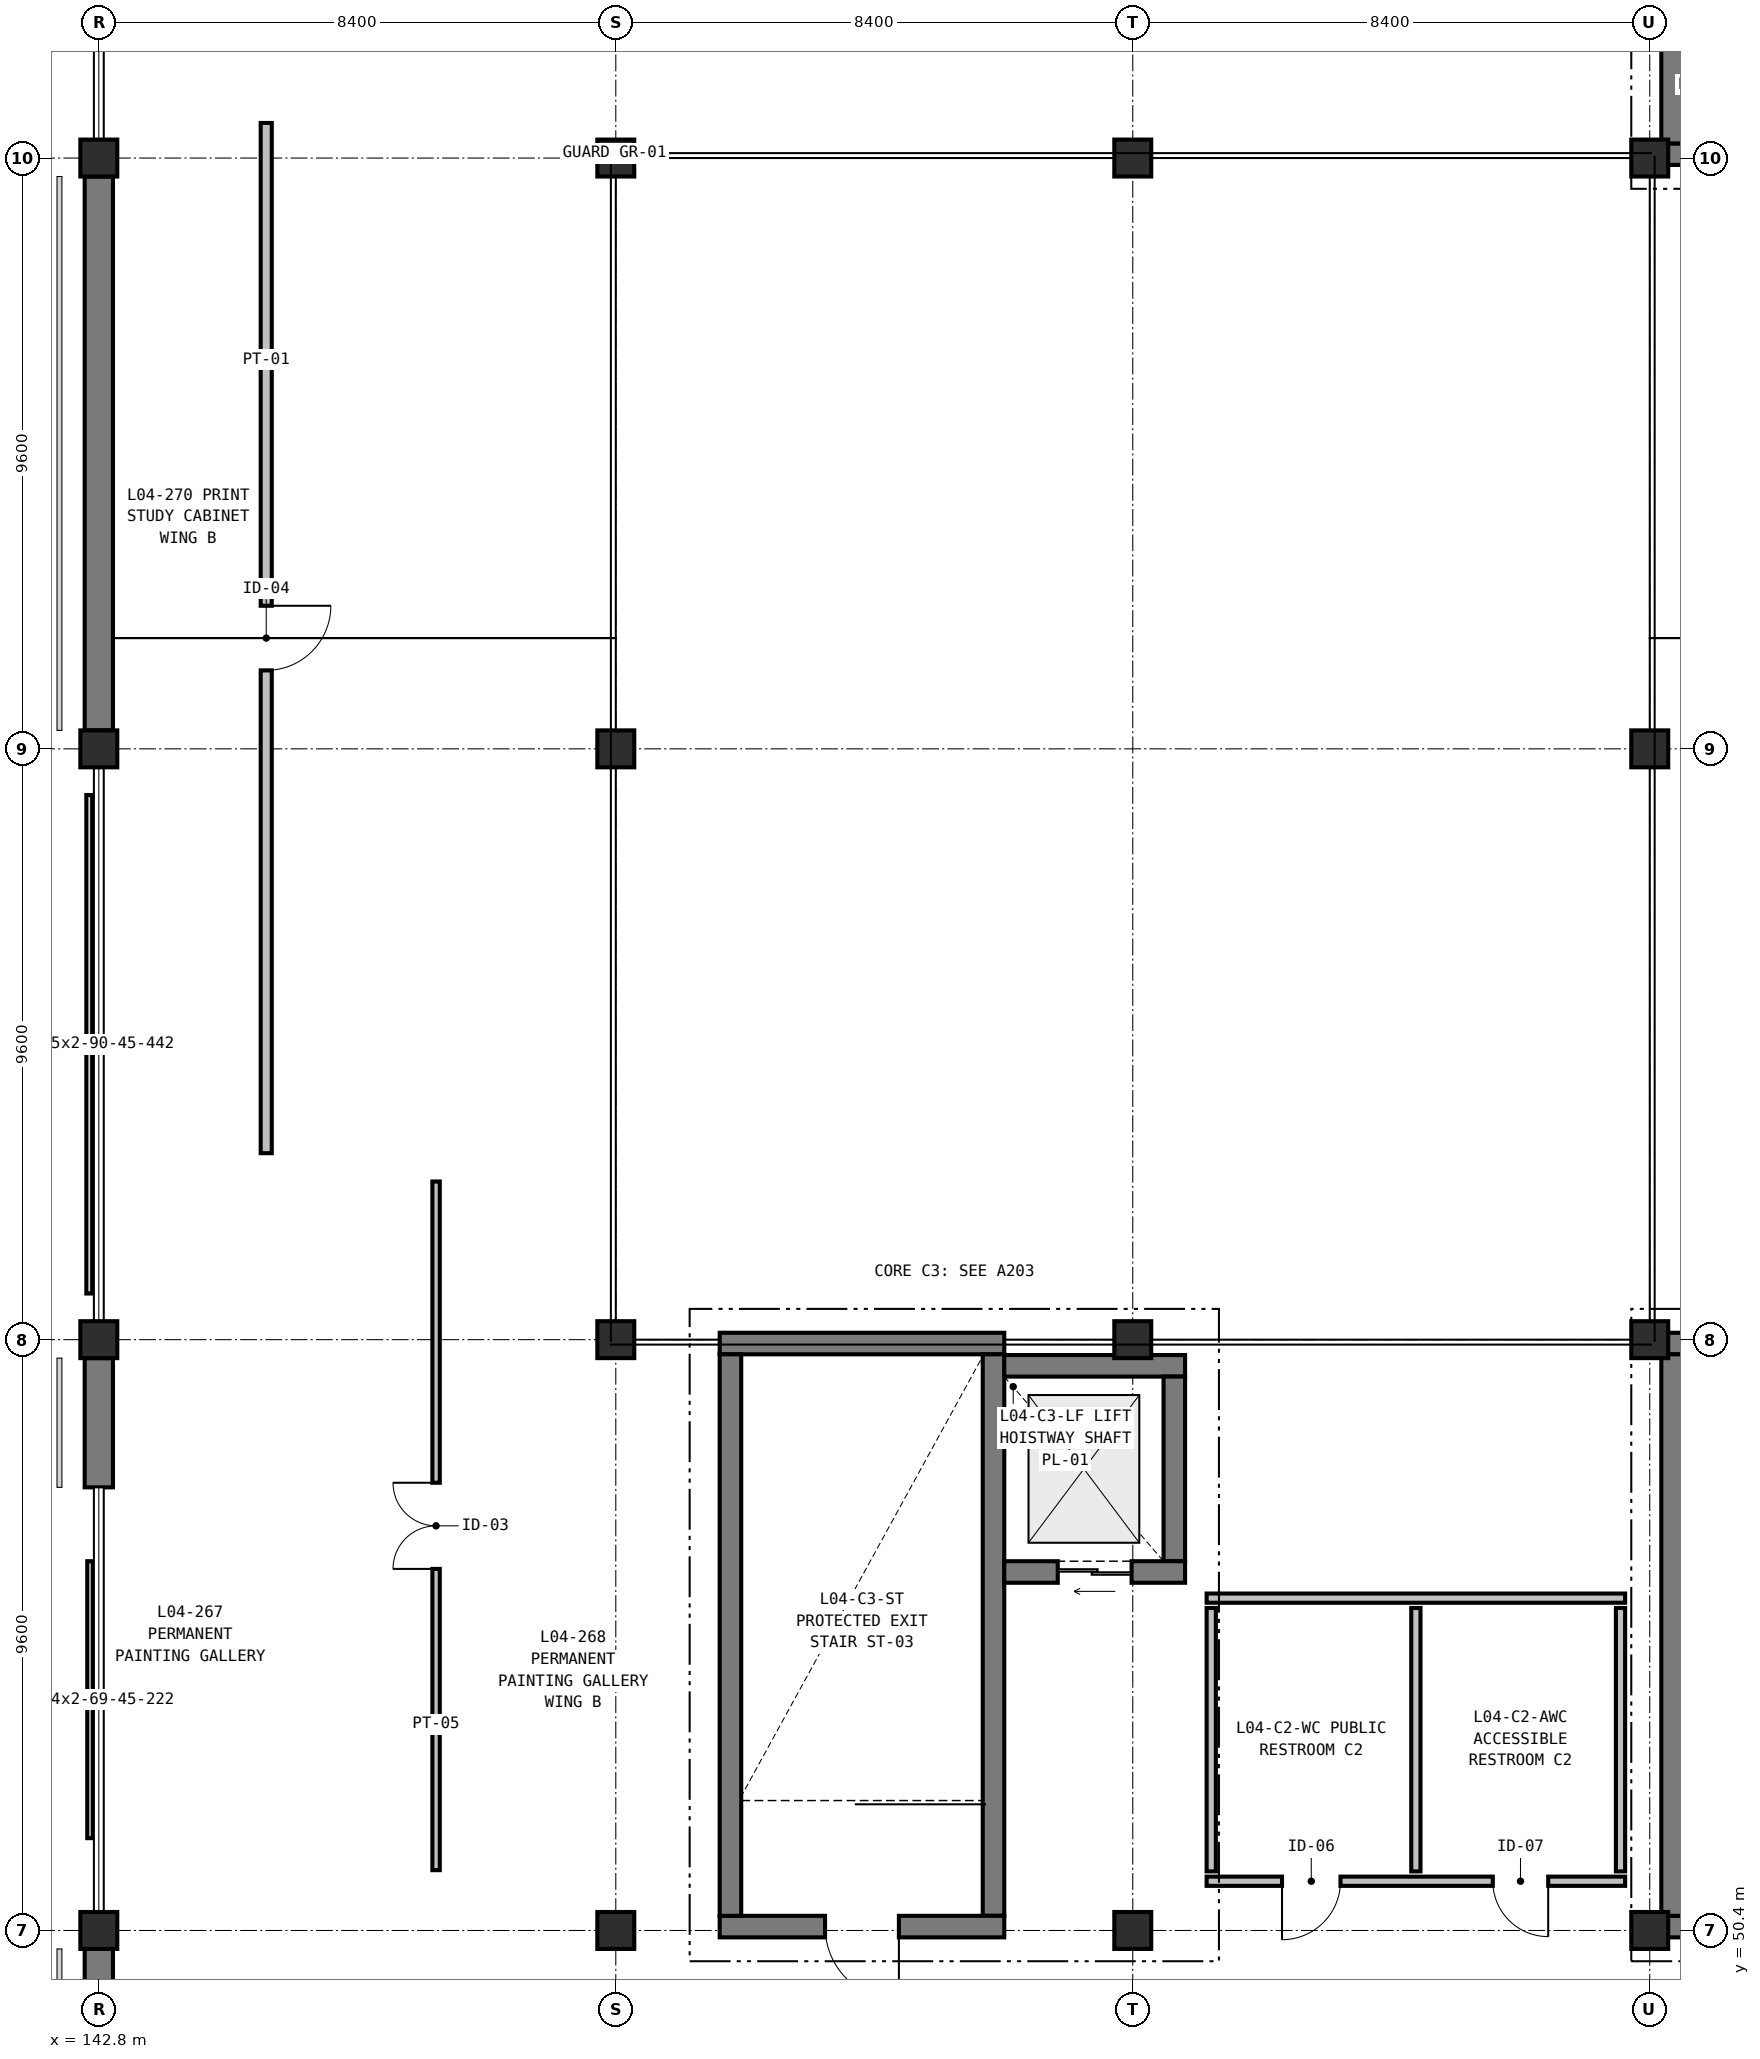
"""IFC4 building model, lengths in metres.
Left out: names, types, materials, properties, quantities, classifications, styles, units other than length and angle.
Written with IfcOpenShell. Run it as: python <this file> out.ifc"""

import sys

from ifc_helpers import new_model, si_unit, direction, frame, frame_2d, origin, origin_2d, place, context, subcontext, project, spatial, rectangle, extrude, element, fill, save


model = new_model("IFC4")
c1 = context("Model", 3, precision=1e-05, world=origin(), true_north=direction((0.0, 1.0)))
c2 = subcontext(c1, "Body", "Model", "MODEL_VIEW")
j1 = project(units=[si_unit("LENGTHUNIT", "METRE"), si_unit("PLANEANGLEUNIT", "RADIAN")], contexts=[c1])
p1 = place(None, origin())
s1 = spatial("IfcSite", under=j1, at=p1, CompositionType="ELEMENT")
p2 = place(p1, origin())
s2 = spatial("IfcBuilding", under=s1, at=p2, CompositionType="ELEMENT")
p3 = place(p2, frame((0.0, 0.0, 22.2)))
s3 = spatial("IfcBuildingStorey", under=s2, at=p3, CompositionType="ELEMENT", Elevation=22.2)
for number, where, z_axis, x_axis in (
    (1, (142.8, 50.4, 0.0), (0.0, 0.0, 1.0), (1.0, 0.0, 0.0)),
    (2, (142.8, 60.0, 0.0), (0.0, 0.0, 1.0), (1.0, 0.0, 0.0)),
    (3, (142.8, 69.6, 0.0), (0.0, 0.0, 1.0), (1.0, 0.0, 0.0)),
    (4, (142.8, 79.2, 0.0), (0.0, 0.0, 1.0), (1.0, 0.0, 0.0)),
    (5, (151.2, 50.4, 0.0), (0.0, 0.0, 1.0), (1.0, 0.0, 0.0)),
    (6, (151.2, 60.0, 0.0), (0.0, 0.0, 1.0), (1.0, 0.0, 0.0)),
    (7, (151.2, 69.6, 0.0), (0.0, 0.0, 1.0), (1.0, 0.0, 0.0)),
    (8, (151.2, 79.2, 0.0), (0.0, 0.0, 1.0), (1.0, 0.0, 0.0)),
    (9, (159.6, 50.4, 0.0), (0.0, 0.0, 1.0), (1.0, 0.0, 0.0)),
    (10, (159.6, 60.0, 0.0), (0.0, 0.0, 1.0), (1.0, 0.0, 0.0)),
    (11, (159.6, 79.2, 0.0), (0.0, 0.0, 1.0), (1.0, 0.0, 0.0)),
    (12, (168.0, 50.4, 0.0), (0.0, 0.0, 1.0), (1.0, 0.0, 0.0)),
    (13, (168.0, 60.0, 0.0), (0.0, 0.0, 1.0), (1.0, 0.0, 0.0)),
    (14, (168.0, 69.6, 0.0), (0.0, 0.0, 1.0), (1.0, 0.0, 0.0)),
    (15, (168.0, 79.2, 0.0), (0.0, 0.0, 1.0), (1.0, 0.0, 0.0)),
):
    element("IfcColumn", number, at=place(p3, frame(where, z_axis=z_axis, x_axis=x_axis)), inside=s3, PredefinedType="COLUMN", context=c2, shape_type="SweptSolid", body=[
        extrude(rectangle(XDim=0.6, YDim=0.6, at=origin_2d()), origin(), (0.0, 0.0, 1.0), 4.8),
    ])
p4 = place(p3, frame((142.8, 45.9, 0.0), z_axis=(0.0, 0.0, 1.0), x_axis=(0.0, 1.0, 0.0)))
e16 = element("IfcWall", 16, at=p4, inside=s3, PredefinedType="SOLIDWALL", context=c2, shape_type="SweptSolid", body=[
    extrude(rectangle(XDim=4.2, YDim=0.46, at=frame_2d((2.1, 0.0))), origin(), (0.0, 0.0, 1.0), 4.5),
])
p5 = place(p3, frame((142.8, 57.6, 0.0), z_axis=(0.0, 0.0, 1.0), x_axis=(0.0, 1.0, 0.0)))
e17 = element("IfcWall", 17, at=p5, inside=s3, PredefinedType="SOLIDWALL", context=c2, shape_type="SweptSolid", body=[
    extrude(rectangle(XDim=2.1, YDim=0.46, at=frame_2d((1.05, 0.0))), origin(), (0.0, 0.0, 1.0), 4.5),
])
p6 = place(p3, frame((142.8, 69.9, 0.0), z_axis=(0.0, 0.0, 1.0), x_axis=(0.0, 1.0, 0.0)))
e18 = element("IfcWall", 18, at=p6, inside=s3, PredefinedType="SOLIDWALL", context=c2, shape_type="SweptSolid", body=[
    extrude(rectangle(XDim=9.0, YDim=0.46, at=frame_2d((4.5, 0.0))), origin(), (0.0, 0.0, 1.0), 4.5),
])
p7 = place(p3, frame((172.812, 79.263, 0.0), z_axis=(0.0, 0.0, 1.0), x_axis=(-1.0, 0.0, 0.0)))
e19 = element("IfcWall", 19, at=p7, inside=s3, PredefinedType="SHEAR", context=c2, shape_type="SweptSolid", body=[
    extrude(rectangle(XDim=4.624, YDim=0.35, at=frame_2d((2.312, 0.0))), origin(), (0.0, 0.0, 1.0), 4.5),
])
p8 = place(p7, frame((1.712, 0.0, 0.0)))
e20 = element("IfcOpeningElement", 20, at=p8, cuts=e19, PredefinedType="OPENING", context=c2, shape_type="SweptSolid", body=[
    extrude(rectangle(XDim=1.2, YDim=2.2, at=frame_2d((0.6, 1.1))), frame((0.0, 0.185, 0.0), z_axis=(0.0, -1.0, 0.0), x_axis=(1.0, 0.0, 0.0)), (0.0, 0.0, 1.0), 0.37),
])
p9 = place(p3, frame((168.363, 79.438, 0.0), z_axis=(0.0, 0.0, 1.0), x_axis=(0.0, 1.0, 0.0)))
e21 = element("IfcWall", 21, at=p9, inside=s3, PredefinedType="SHEAR", context=c2, shape_type="SweptSolid", body=[
    extrude(rectangle(XDim=9.124, YDim=0.35, at=frame_2d((4.562, 0.0))), origin(), (0.0, 0.0, 1.0), 4.5),
])
p10 = place(p3, frame((168.188, 59.937, 0.0), z_axis=(0.0, 0.0, 1.0), x_axis=(1.0, 0.0, 0.0)))
e22 = element("IfcWall", 22, at=p10, inside=s3, PredefinedType="SHEAR", context=c2, shape_type="SweptSolid", body=[
    extrude(rectangle(XDim=4.624, YDim=0.35, at=frame_2d((2.312, 0.0))), origin(), (0.0, 0.0, 1.0), 4.5),
])
p11 = place(p3, frame((172.812, 50.463, 0.0), z_axis=(0.0, 0.0, 1.0), x_axis=(-1.0, 0.0, 0.0)))
e23 = element("IfcWall", 23, at=p11, inside=s3, PredefinedType="SHEAR", context=c2, shape_type="SweptSolid", body=[
    extrude(rectangle(XDim=4.624, YDim=0.35, at=frame_2d((2.312, 0.0))), origin(), (0.0, 0.0, 1.0), 4.5),
])
p12 = place(p11, frame((1.712, 0.0, 0.0)))
e24 = element("IfcOpeningElement", 24, at=p12, cuts=e23, PredefinedType="OPENING", context=c2, shape_type="SweptSolid", body=[
    extrude(rectangle(XDim=1.2, YDim=2.2, at=frame_2d((0.6, 1.1))), frame((0.0, 0.185, 0.0), z_axis=(0.0, -1.0, 0.0), x_axis=(1.0, 0.0, 0.0)), (0.0, 0.0, 1.0), 0.37),
])
p13 = place(p3, frame((168.363, 50.638, 0.0), z_axis=(0.0, 0.0, 1.0), x_axis=(0.0, 1.0, 0.0)))
e25 = element("IfcWall", 25, at=p13, inside=s3, PredefinedType="SHEAR", context=c2, shape_type="SweptSolid", body=[
    extrude(rectangle(XDim=9.124, YDim=0.35, at=frame_2d((4.562, 0.0))), origin(), (0.0, 0.0, 1.0), 4.5),
])
p14 = place(p3, frame((167.6, 51.2, 0.0), z_axis=(0.0, 0.0, 1.0), x_axis=(-1.0, 0.0, 0.0)))
e26 = element("IfcWall", 26, at=p14, inside=s3, PredefinedType="PARTITIONING", context=c2, shape_type="SweptSolid", body=[
    extrude(rectangle(XDim=6.8, YDim=0.15, at=frame_2d((3.4, 0.0))), origin(), (0.0, 0.0, 1.0), 4.5),
])
p15 = place(p14, frame((1.25, 0.0, 0.0)))
e27 = element("IfcOpeningElement", 27, at=p15, cuts=e26, PredefinedType="OPENING", context=c2, shape_type="SweptSolid", body=[
    extrude(rectangle(XDim=0.9, YDim=2.1, at=frame_2d((0.45, 1.05))), frame((0.0, 0.085, 0.0), z_axis=(0.0, -1.0, 0.0), x_axis=(1.0, 0.0, 0.0)), (0.0, 0.0, 1.0), 0.17),
])
p16 = place(p14, frame((4.625, 0.0, 0.0)))
e28 = element("IfcOpeningElement", 28, at=p16, cuts=e26, PredefinedType="OPENING", context=c2, shape_type="SweptSolid", body=[
    extrude(rectangle(XDim=0.95, YDim=2.15, at=frame_2d((0.475, 1.075))), frame((0.0, 0.085, 0.0), z_axis=(0.0, -1.0, 0.0), x_axis=(1.0, 0.0, 0.0)), (0.0, 0.0, 1.0), 0.17),
])
p17 = place(p3, frame((160.8, 55.8, 0.0), z_axis=(0.0, 0.0, 1.0), x_axis=(1.0, 0.0, 0.0)))
e29 = element("IfcWall", 29, at=p17, inside=s3, PredefinedType="PARTITIONING", context=c2, shape_type="SweptSolid", body=[
    extrude(rectangle(XDim=6.8, YDim=0.15, at=frame_2d((3.4, 0.0))), origin(), (0.0, 0.0, 1.0), 4.5),
])
for number, where, z_axis, x_axis in (
    (30, (160.875, 51.36, 0.0), (0.0, 0.0, 1.0), (0.0, 1.0, 0.0)),
    (31, (164.2, 51.36, 0.0), (0.0, 0.0, 1.0), (0.0, 1.0, 0.0)),
    (32, (167.525, 51.36, 0.0), (0.0, 0.0, 1.0), (0.0, 1.0, 0.0)),
):
    element("IfcWall", number, at=place(p3, frame(where, z_axis=z_axis, x_axis=x_axis)), inside=s3, PredefinedType="PARTITIONING", context=c2, shape_type="SweptSolid", body=[
        extrude(rectangle(XDim=4.28, YDim=0.15, at=frame_2d((2.14, 0.0))), origin(), (0.0, 0.0, 1.0), 4.5),
    ])
p18 = place(p3, frame((152.888, 59.937, 0.0), z_axis=(0.0, 0.0, 1.0), x_axis=(1.0, 0.0, 0.0)))
e33 = element("IfcWall", 33, at=p18, inside=s3, PredefinedType="SHEAR", context=c2, shape_type="SweptSolid", body=[
    extrude(rectangle(XDim=4.624, YDim=0.35, at=frame_2d((2.312, 0.0))), origin(), (0.0, 0.0, 1.0), 4.5),
])
p19 = place(p3, frame((157.337, 59.762, 0.0), z_axis=(0.0, 0.0, 1.0), x_axis=(0.0, -1.0, 0.0)))
e34 = element("IfcWall", 34, at=p19, inside=s3, PredefinedType="SHEAR", context=c2, shape_type="SweptSolid", body=[
    extrude(rectangle(XDim=9.124, YDim=0.35, at=frame_2d((4.562, 0.0))), origin(), (0.0, 0.0, 1.0), 4.5),
])
p20 = place(p3, frame((157.512, 50.463, 0.0), z_axis=(0.0, 0.0, 1.0), x_axis=(-1.0, 0.0, 0.0)))
e35 = element("IfcWall", 35, at=p20, inside=s3, PredefinedType="SHEAR", context=c2, shape_type="SweptSolid", body=[
    extrude(rectangle(XDim=4.624, YDim=0.35, at=frame_2d((2.312, 0.0))), origin(), (0.0, 0.0, 1.0), 4.5),
])
p21 = place(p20, frame((1.712, 0.0, 0.0)))
e36 = element("IfcOpeningElement", 36, at=p21, cuts=e35, PredefinedType="OPENING", context=c2, shape_type="SweptSolid", body=[
    extrude(rectangle(XDim=1.2, YDim=2.2, at=frame_2d((0.6, 1.1))), frame((0.0, 0.185, 0.0), z_axis=(0.0, -1.0, 0.0), x_axis=(1.0, 0.0, 0.0)), (0.0, 0.0, 1.0), 0.37),
])
p22 = place(p3, frame((153.063, 50.638, 0.0), z_axis=(0.0, 0.0, 1.0), x_axis=(0.0, 1.0, 0.0)))
e37 = element("IfcWall", 37, at=p22, inside=s3, PredefinedType="SHEAR", context=c2, shape_type="SweptSolid", body=[
    extrude(rectangle(XDim=9.124, YDim=0.35, at=frame_2d((4.562, 0.0))), origin(), (0.0, 0.0, 1.0), 4.5),
])
p23 = place(p3, frame((157.512, 59.575, 0.0), z_axis=(0.0, 0.0, 1.0), x_axis=(1.0, 0.0, 0.0)))
e38 = element("IfcWall", 38, at=p23, inside=s3, PredefinedType="SHEAR", context=c2, shape_type="SweptSolid", body=[
    extrude(rectangle(XDim=2.938, YDim=0.35, at=frame_2d((1.469, 0.0))), origin(), (0.0, 0.0, 1.0), 4.5),
])
p24 = place(p3, frame((160.275, 59.4, 0.0), z_axis=(0.0, 0.0, 1.0), x_axis=(0.0, -1.0, 0.0)))
e39 = element("IfcWall", 39, at=p24, inside=s3, PredefinedType="SHEAR", context=c2, shape_type="SweptSolid", body=[
    extrude(rectangle(XDim=3.0, YDim=0.35, at=frame_2d((1.5, 0.0))), origin(), (0.0, 0.0, 1.0), 4.5),
])
p25 = place(p3, frame((160.45, 56.225, 0.0), z_axis=(0.0, 0.0, 1.0), x_axis=(-1.0, 0.0, 0.0)))
e40 = element("IfcWall", 40, at=p25, inside=s3, PredefinedType="SHEAR", context=c2, shape_type="SweptSolid", body=[
    extrude(rectangle(XDim=2.938, YDim=0.35, at=frame_2d((1.469, 0.0))), origin(), (0.0, 0.0, 1.0), 4.5),
])
p26 = place(p25, frame((0.869, 0.0, 0.0)))
e41 = element("IfcOpeningElement", 41, at=p26, cuts=e40, PredefinedType="OPENING", context=c2, shape_type="SweptSolid", body=[
    extrude(rectangle(XDim=1.2, YDim=2.2, at=frame_2d((0.6, 1.1))), frame((0.0, 0.185, 0.0), z_axis=(0.0, -1.0, 0.0), x_axis=(1.0, 0.0, 0.0)), (0.0, 0.0, 1.0), 0.37),
])
p27 = place(p3, frame((148.28, 51.38, 0.0), z_axis=(0.0, 0.0, 1.0), x_axis=(0.0, 1.0, 0.0)))
e42 = element("IfcWall", 42, at=p27, inside=s3, PredefinedType="PARTITIONING", context=c2, shape_type="SweptSolid", body=[
    extrude(rectangle(XDim=11.19, YDim=0.12, at=frame_2d((5.595, 0.0))), origin(), (0.0, 0.0, 1.0), 3.825),
])
p28 = place(p27, frame((4.895, 0.0, 0.0)))
e43 = element("IfcOpeningElement", 43, at=p28, cuts=e42, PredefinedType="OPENING", context=c2, shape_type="SweptSolid", body=[
    extrude(rectangle(XDim=1.4, YDim=2.3, at=frame_2d((0.7, 1.15))), frame((0.0, 0.07, 0.0), z_axis=(0.0, -1.0, 0.0), x_axis=(1.0, 0.0, 0.0)), (0.0, 0.0, 1.0), 0.14),
])
p29 = place(p3, frame((145.52, 79.77, 0.0), z_axis=(0.0, 0.0, 1.0), x_axis=(0.0, -1.0, 0.0)))
e44 = element("IfcWall", 44, at=p29, inside=s3, PredefinedType="PARTITIONING", context=c2, shape_type="SweptSolid", body=[
    extrude(rectangle(XDim=16.74, YDim=0.18, at=frame_2d((8.37, 0.0))), origin(), (0.0, 0.0, 1.0), 3.825),
])
p30 = place(p29, frame((7.845, 0.0, 0.0)))
e45 = element("IfcOpeningElement", 45, at=p30, cuts=e44, PredefinedType="OPENING", context=c2, shape_type="SweptSolid", body=[
    extrude(rectangle(XDim=1.05, YDim=2.2, at=frame_2d((0.525, 1.1))), frame((0.0, 0.1, 0.0), z_axis=(0.0, -1.0, 0.0), x_axis=(1.0, 0.0, 0.0)), (0.0, 0.0, 1.0), 0.2),
])
p31 = place(p15, origin())
e46 = element("IfcDoor", 46, at=p31, inside=s3, OperationType="SINGLE_SWING_LEFT", PredefinedType="DOOR", context=c2, shape_type="SweptSolid", body=[
    extrude(rectangle(XDim=0.9, YDim=2.1, at=frame_2d((0.45, 1.05))), frame((0.0, 0.025, 0.0), z_axis=(0.0, -1.0, 0.0), x_axis=(1.0, 0.0, 0.0)), (0.0, 0.0, 1.0), 0.05),
])
fill(e27, e46)
p32 = place(p16, origin())
e47 = element("IfcDoor", 47, at=p32, inside=s3, OperationType="SINGLE_SWING_RIGHT", PredefinedType="DOOR", context=c2, shape_type="SweptSolid", body=[
    extrude(rectangle(XDim=0.95, YDim=2.15, at=frame_2d((0.475, 1.075))), frame((0.0, 0.025, 0.0), z_axis=(0.0, -1.0, 0.0), x_axis=(1.0, 0.0, 0.0)), (0.0, 0.0, 1.0), 0.05),
])
fill(e28, e47)
p33 = place(p21, origin())
e48 = element("IfcDoor", 48, at=p33, inside=s3, OperationType="SINGLE_SWING_LEFT", PredefinedType="DOOR", context=c2, shape_type="SweptSolid", body=[
    extrude(rectangle(XDim=1.2, YDim=2.2, at=frame_2d((0.6, 1.1))), frame((0.0, 0.025, 0.0), z_axis=(0.0, -1.0, 0.0), x_axis=(1.0, 0.0, 0.0)), (0.0, 0.0, 1.0), 0.05),
])
fill(e36, e48)
p34 = place(p26, origin())
e49 = element("IfcDoor", 49, at=p34, inside=s3, OperationType="DOUBLE_DOOR_SLIDING", PredefinedType="DOOR", context=c2, shape_type="SweptSolid", body=[
    extrude(rectangle(XDim=1.2, YDim=2.2, at=frame_2d((0.6, 1.1))), frame((0.0, 0.025, 0.0), z_axis=(0.0, -1.0, 0.0), x_axis=(1.0, 0.0, 0.0)), (0.0, 0.0, 1.0), 0.05),
])
fill(e41, e49)
p35 = place(p28, origin())
e50 = element("IfcDoor", 50, at=p35, inside=s3, OperationType="DOUBLE_DOOR_SINGLE_SWING", PredefinedType="DOOR", context=c2, shape_type="SweptSolid", body=[
    extrude(rectangle(XDim=1.4, YDim=2.3, at=frame_2d((0.7, 1.15))), frame((0.0, 0.025, 0.0), z_axis=(0.0, -1.0, 0.0), x_axis=(1.0, 0.0, 0.0)), (0.0, 0.0, 1.0), 0.05),
])
fill(e43, e50)
p36 = place(p30, origin())
e51 = element("IfcDoor", 51, at=p36, inside=s3, OperationType="SINGLE_SWING_LEFT", PredefinedType="DOOR", context=c2, shape_type="SweptSolid", body=[
    extrude(rectangle(XDim=1.05, YDim=2.2, at=frame_2d((0.525, 1.1))), frame((0.0, 0.025, 0.0), z_axis=(0.0, -1.0, 0.0), x_axis=(1.0, 0.0, 0.0)), (0.0, 0.0, 1.0), 0.05),
])
fill(e45, e51)
save(model, sys.argv[1])
